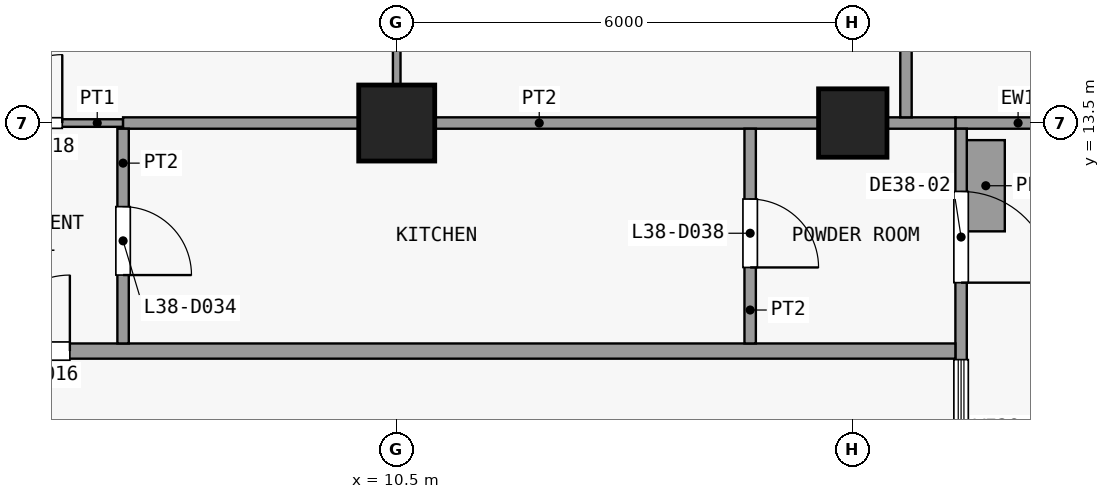
"""IFC4 building model, lengths in metres.
Left out: names, types, materials, properties, quantities, classifications, styles, units other than length and angle.
Written with IfcOpenShell. Run it as: python <this file> out.ifc"""

import sys

from ifc_helpers import new_model, si_unit, direction, frame, frame_2d, origin, origin_2d, place, context, subcontext, project, spatial, rectangle, extrude, element, fill, save


model = new_model("IFC4")
c1 = context("Model", 3, precision=1e-05, world=origin(), true_north=direction((0.0, 1.0)))
c2 = subcontext(c1, "Body", "Model", "MODEL_VIEW")
j1 = project(units=[si_unit("LENGTHUNIT", "METRE"), si_unit("PLANEANGLEUNIT", "RADIAN")], contexts=[c1])
p1 = place(None, origin())
s1 = spatial("IfcSite", under=j1, at=p1, CompositionType="ELEMENT")
p2 = place(p1, origin())
s2 = spatial("IfcBuilding", under=s1, at=p2, CompositionType="ELEMENT")
p3 = place(p2, frame((0.0, 0.0, 156.5)))
s3 = spatial("IfcBuildingStorey", under=s2, at=p3, CompositionType="ELEMENT", Elevation=156.5)
p4 = place(p3, frame((10.5, 13.5, 0.0), z_axis=(0.0, 0.0, 1.0), x_axis=(1.0, 0.0, 0.0)))
e1 = element("IfcColumn", 1, at=p4, inside=s3, PredefinedType="COLUMN", context=c2, shape_type="SweptSolid", body=[
    extrude(rectangle(XDim=1.0, YDim=1.0, at=origin_2d()), origin(), (0.0, 0.0, 1.0), 3.6),
])
p5 = place(p3, frame((16.5, 13.5, 0.0), z_axis=(0.0, 0.0, 1.0), x_axis=(1.0, 0.0, 0.0)))
e2 = element("IfcColumn", 2, at=p5, inside=s3, PredefinedType="COLUMN", context=c2, shape_type="SweptSolid", body=[
    extrude(rectangle(XDim=0.9, YDim=0.9, at=origin_2d()), origin(), (0.0, 0.0, 1.0), 3.6),
])
p6 = place(p3, frame((17.85, 13.5, 0.0), z_axis=(0.0, 0.0, 1.0), x_axis=(1.0, 0.0, 0.0)))
e3 = element("IfcWall", 3, at=p6, inside=s3, PredefinedType="SOLIDWALL", context=c2, shape_type="SweptSolid", body=[
    extrude(rectangle(XDim=1.65, YDim=0.15, at=frame_2d((0.825, 0.0))), origin(), (0.0, 0.0, 1.0), 3.3),
])
p7 = place(p3, frame((17.925, 13.425, 0.0), z_axis=(0.0, 0.0, 1.0), x_axis=(0.0, -1.0, 0.0)))
e4 = element("IfcWall", 4, at=p7, inside=s3, PredefinedType="SOLIDWALL", context=c2, shape_type="SweptSolid", body=[
    extrude(rectangle(XDim=5.85, YDim=0.15, at=frame_2d((2.925, 0.0))), origin(), (0.0, 0.0, 1.0), 3.3),
])
p8 = place(p7, frame((0.825, 0.0, 0.0)))
e5 = element("IfcOpeningElement", 5, at=p8, cuts=e4, PredefinedType="OPENING", context=c2, shape_type="SweptSolid", body=[
    extrude(rectangle(XDim=1.2, YDim=2.4, at=frame_2d((0.6, 1.2))), frame((0.0, 0.085, 0.0), z_axis=(0.0, -1.0, 0.0), x_axis=(1.0, 0.0, 0.0)), (0.0, 0.0, 1.0), 0.17),
])
p9 = place(p7, frame((3.038, 0.0, 0.9)))
e6 = element("IfcOpeningElement", 6, at=p9, cuts=e4, PredefinedType="OPENING", context=c2, shape_type="SweptSolid", body=[
    extrude(rectangle(XDim=1.8, YDim=2.1, at=frame_2d((0.9, 1.05))), frame((0.0, 0.085, 0.0), z_axis=(0.0, -1.0, 0.0), x_axis=(1.0, 0.0, 0.0)), (0.0, 0.0, 1.0), 0.17),
])
p10 = place(p3, frame((18.25, 12.075, 0.0), z_axis=(0.0, 0.0, 1.0), x_axis=(0.0, 1.0, 0.0)))
e7 = element("IfcWall", 7, at=p10, inside=s3, PredefinedType="USERDEFINED", context=c2, shape_type="SweptSolid", body=[
    extrude(rectangle(XDim=1.2, YDim=0.5, at=frame_2d((0.6, 0.0))), origin(), (0.0, 0.0, 1.0), 0.9),
])
p11 = place(p3, frame((-19.35, 10.5, 0.0), z_axis=(0.0, 0.0, 1.0), x_axis=(1.0, 0.0, 0.0)))
e8 = element("IfcWall", 8, at=p11, inside=s3, PredefinedType="PARTITIONING", context=c2, shape_type="SweptSolid", body=[
    extrude(rectangle(XDim=37.2, YDim=0.2, at=frame_2d((18.6, 0.0))), origin(), (0.0, 0.0, 1.0), 3.3),
])
p12 = place(p11, frame((7.05, 0.0, 0.0)))
e9 = element("IfcOpeningElement", 9, at=p12, cuts=e8, PredefinedType="OPENING", context=c2, shape_type="SweptSolid", body=[
    extrude(rectangle(XDim=1.0, YDim=2.1, at=frame_2d((0.5, 1.05))), frame((0.0, 0.11, 0.0), z_axis=(0.0, -1.0, 0.0), x_axis=(1.0, 0.0, 0.0)), (0.0, 0.0, 1.0), 0.22),
])
p13 = place(p11, frame((24.55, 0.0, 0.0)))
e10 = element("IfcOpeningElement", 10, at=p13, cuts=e8, PredefinedType="OPENING", context=c2, shape_type="SweptSolid", body=[
    extrude(rectangle(XDim=1.0, YDim=2.1, at=frame_2d((0.5, 1.05))), frame((0.0, 0.11, 0.0), z_axis=(0.0, -1.0, 0.0), x_axis=(1.0, 0.0, 0.0)), (0.0, 0.0, 1.0), 0.22),
])
p14 = place(p3, frame((4.5, 13.5, 0.0), z_axis=(0.0, 0.0, 1.0), x_axis=(1.0, 0.0, 0.0)))
e11 = element("IfcWall", 11, at=p14, inside=s3, PredefinedType="PARTITIONING", context=c2, shape_type="SweptSolid", body=[
    extrude(rectangle(XDim=2.4, YDim=0.1, at=frame_2d((1.2, 0.0))), origin(), (0.0, 0.0, 1.0), 3.3),
])
p15 = place(p14, frame((0.7, 0.0, 0.0)))
e12 = element("IfcOpeningElement", 12, at=p15, cuts=e11, PredefinedType="OPENING", context=c2, shape_type="SweptSolid", body=[
    extrude(rectangle(XDim=0.9, YDim=2.1, at=frame_2d((0.45, 1.05))), frame((0.0, 0.06, 0.0), z_axis=(0.0, -1.0, 0.0), x_axis=(1.0, 0.0, 0.0)), (0.0, 0.0, 1.0), 0.12),
])
p16 = place(p3, frame((6.9, 13.5, 0.0), z_axis=(0.0, 0.0, 1.0), x_axis=(1.0, 0.0, 0.0)))
e13 = element("IfcWall", 13, at=p16, inside=s3, PredefinedType="PARTITIONING", context=c2, shape_type="SweptSolid", body=[
    extrude(rectangle(XDim=10.95, YDim=0.15, at=frame_2d((5.475, 0.0))), origin(), (0.0, 0.0, 1.0), 3.3),
])
p17 = place(p3, frame((6.9, 10.6, 0.0), z_axis=(0.0, 0.0, 1.0), x_axis=(0.0, 1.0, 0.0)))
e14 = element("IfcWall", 14, at=p17, inside=s3, PredefinedType="PARTITIONING", context=c2, shape_type="SweptSolid", body=[
    extrude(rectangle(XDim=2.825, YDim=0.15, at=frame_2d((1.413, 0.0))), origin(), (0.0, 0.0, 1.0), 3.3),
])
p18 = place(p17, frame((0.9, 0.0, 0.0)))
e15 = element("IfcOpeningElement", 15, at=p18, cuts=e14, PredefinedType="OPENING", context=c2, shape_type="SweptSolid", body=[
    extrude(rectangle(XDim=0.9, YDim=2.1, at=frame_2d((0.45, 1.05))), frame((0.0, 0.085, 0.0), z_axis=(0.0, -1.0, 0.0), x_axis=(1.0, 0.0, 0.0)), (0.0, 0.0, 1.0), 0.17),
])
p19 = place(p3, frame((10.5, 13.575, 0.0), z_axis=(0.0, 0.0, 1.0), x_axis=(0.0, 1.0, 0.0)))
e16 = element("IfcWall", 16, at=p19, inside=s3, PredefinedType="PARTITIONING", context=c2, shape_type="SweptSolid", body=[
    extrude(rectangle(XDim=7.275, YDim=0.1, at=frame_2d((3.638, 0.0))), origin(), (0.0, 0.0, 1.0), 3.3),
])
p20 = place(p19, frame((2.0, 0.0, 0.0)))
e17 = element("IfcOpeningElement", 17, at=p20, cuts=e16, PredefinedType="OPENING", context=c2, shape_type="SweptSolid", body=[
    extrude(rectangle(XDim=0.9, YDim=2.1, at=frame_2d((0.45, 1.05))), frame((0.0, 0.06, 0.0), z_axis=(0.0, -1.0, 0.0), x_axis=(1.0, 0.0, 0.0)), (0.0, 0.0, 1.0), 0.12),
])
p21 = place(p3, frame((15.15, 10.6, 0.0), z_axis=(0.0, 0.0, 1.0), x_axis=(0.0, 1.0, 0.0)))
e18 = element("IfcWall", 18, at=p21, inside=s3, PredefinedType="PARTITIONING", context=c2, shape_type="SweptSolid", body=[
    extrude(rectangle(XDim=2.825, YDim=0.15, at=frame_2d((1.413, 0.0))), origin(), (0.0, 0.0, 1.0), 3.3),
])
p22 = place(p21, frame((1.0, 0.0, 0.0)))
e19 = element("IfcOpeningElement", 19, at=p22, cuts=e18, PredefinedType="OPENING", context=c2, shape_type="SweptSolid", body=[
    extrude(rectangle(XDim=0.9, YDim=2.1, at=frame_2d((0.45, 1.05))), frame((0.0, 0.085, 0.0), z_axis=(0.0, -1.0, 0.0), x_axis=(1.0, 0.0, 0.0)), (0.0, 0.0, 1.0), 0.17),
])
p23 = place(p3, frame((17.2, 13.575, 0.0), z_axis=(0.0, 0.0, 1.0), x_axis=(0.0, 1.0, 0.0)))
e20 = element("IfcWall", 20, at=p23, inside=s3, PredefinedType="PARTITIONING", context=c2, shape_type="SweptSolid", body=[
    extrude(rectangle(XDim=4.775, YDim=0.15, at=frame_2d((2.388, 0.0))), origin(), (0.0, 0.0, 1.0), 3.3),
])
p24 = place(p23, frame((1.9, 0.0, 0.0)))
e21 = element("IfcOpeningElement", 21, at=p24, cuts=e20, PredefinedType="OPENING", context=c2, shape_type="SweptSolid", body=[
    extrude(rectangle(XDim=0.9, YDim=2.1, at=frame_2d((0.45, 1.05))), frame((0.0, 0.085, 0.0), z_axis=(0.0, -1.0, 0.0), x_axis=(1.0, 0.0, 0.0)), (0.0, 0.0, 1.0), 0.17),
])
p25 = place(p8, origin())
e22 = element("IfcDoor", 22, at=p25, inside=s3, OperationType="SINGLE_SWING_RIGHT", PredefinedType="DOOR", context=c2, shape_type="SweptSolid", body=[
    extrude(rectangle(XDim=1.2, YDim=2.4, at=frame_2d((0.6, 1.2))), frame((0.0, 0.025, 0.0), z_axis=(0.0, -1.0, 0.0), x_axis=(1.0, 0.0, 0.0)), (0.0, 0.0, 1.0), 0.05),
])
fill(e5, e22)
p26 = place(p9, origin())
e23 = element("IfcWindow", 23, at=p26, inside=s3, PartitioningType="SINGLE_PANEL", PredefinedType="WINDOW", context=c2, shape_type="SweptSolid", body=[
    extrude(rectangle(XDim=1.8, YDim=2.1, at=frame_2d((0.9, 1.05))), frame((0.0, 0.03, 0.0), z_axis=(0.0, -1.0, 0.0), x_axis=(1.0, 0.0, 0.0)), (0.0, 0.0, 1.0), 0.06),
])
fill(e6, e23)
p27 = place(p13, origin())
e24 = element("IfcDoor", 24, at=p27, inside=s3, OperationType="SINGLE_SWING_LEFT", PredefinedType="DOOR", context=c2, shape_type="SweptSolid", body=[
    extrude(rectangle(XDim=1.0, YDim=2.1, at=frame_2d((0.5, 1.05))), frame((0.0, 0.025, 0.0), z_axis=(0.0, -1.0, 0.0), x_axis=(1.0, 0.0, 0.0)), (0.0, 0.0, 1.0), 0.05),
])
fill(e10, e24)
p28 = place(p15, origin())
e25 = element("IfcDoor", 25, at=p28, inside=s3, OperationType="SINGLE_SWING_LEFT", PredefinedType="DOOR", context=c2, shape_type="SweptSolid", body=[
    extrude(rectangle(XDim=0.9, YDim=2.1, at=frame_2d((0.45, 1.05))), frame((0.0, 0.025, 0.0), z_axis=(0.0, -1.0, 0.0), x_axis=(1.0, 0.0, 0.0)), (0.0, 0.0, 1.0), 0.05),
])
fill(e12, e25)
p29 = place(p18, origin())
e26 = element("IfcDoor", 26, at=p29, inside=s3, OperationType="SINGLE_SWING_LEFT", PredefinedType="DOOR", context=c2, shape_type="SweptSolid", body=[
    extrude(rectangle(XDim=0.9, YDim=2.1, at=frame_2d((0.45, 1.05))), frame((0.0, 0.025, 0.0), z_axis=(0.0, -1.0, 0.0), x_axis=(1.0, 0.0, 0.0)), (0.0, 0.0, 1.0), 0.05),
])
fill(e15, e26)
p30 = place(p22, origin())
e27 = element("IfcDoor", 27, at=p30, inside=s3, OperationType="SINGLE_SWING_LEFT", PredefinedType="DOOR", context=c2, shape_type="SweptSolid", body=[
    extrude(rectangle(XDim=0.9, YDim=2.1, at=frame_2d((0.45, 1.05))), frame((0.0, 0.025, 0.0), z_axis=(0.0, -1.0, 0.0), x_axis=(1.0, 0.0, 0.0)), (0.0, 0.0, 1.0), 0.05),
])
fill(e19, e27)
save(model, sys.argv[1])
